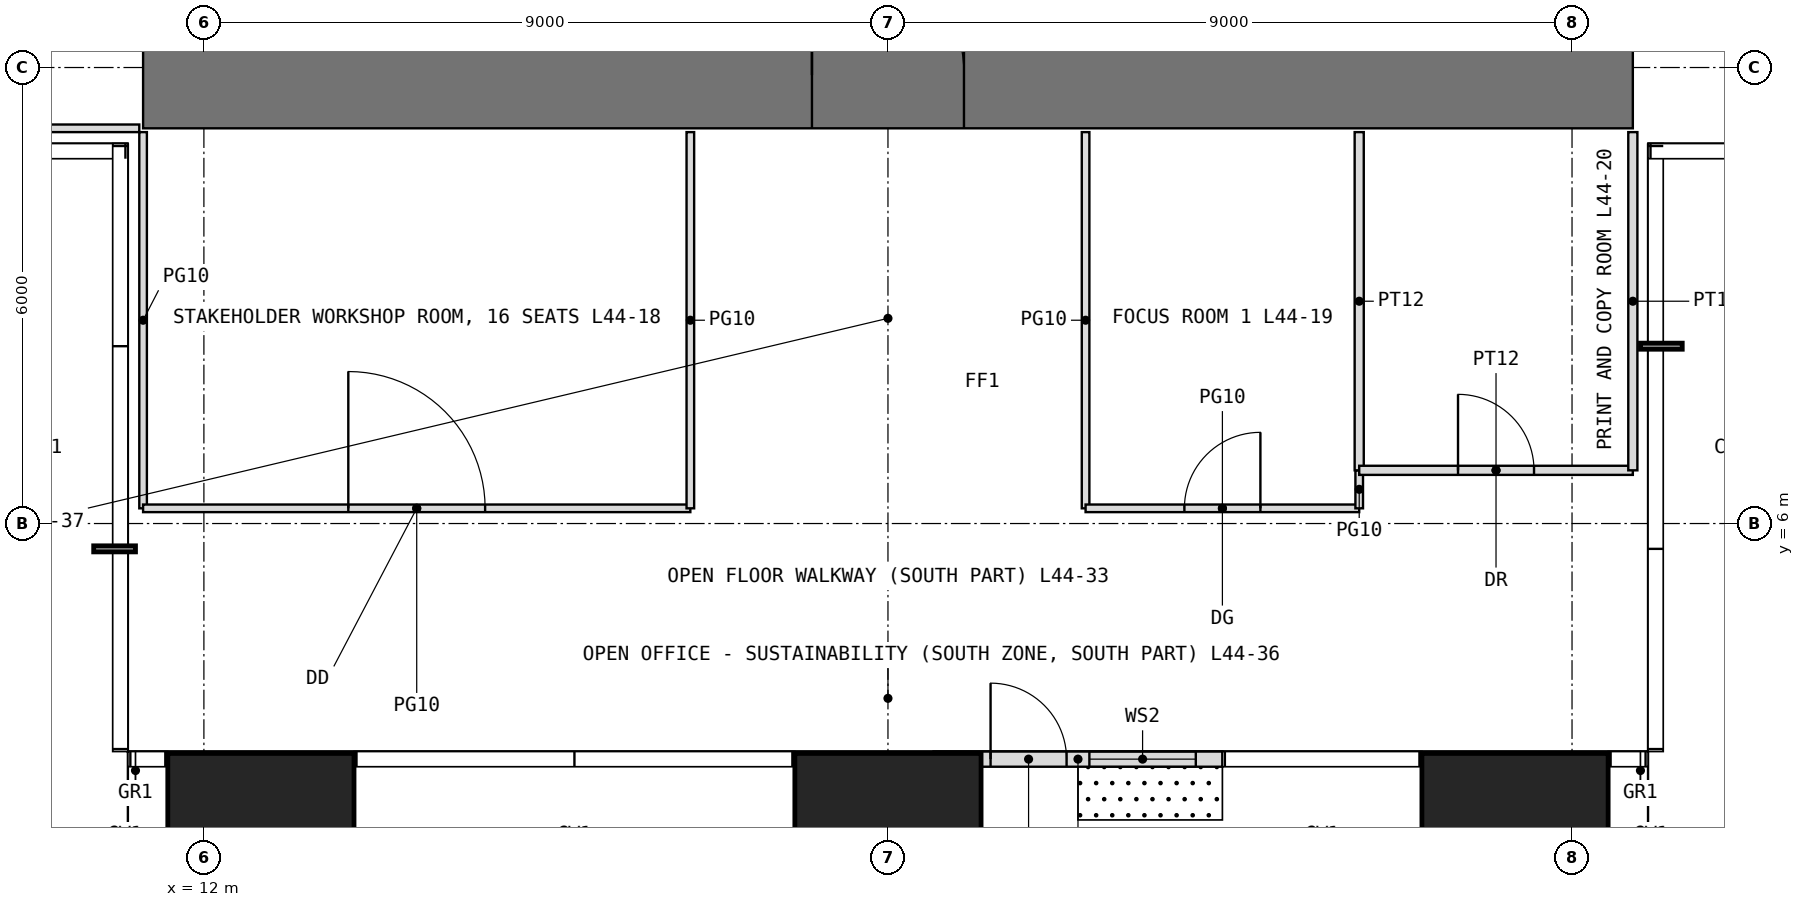
"""IFC4 building model, lengths in metres.
Left out: names, types, materials, properties, quantities, classifications, styles, units other than length and angle.
Written with IfcOpenShell. Run it as: python <this file> out.ifc"""

import sys

from ifc_helpers import new_model, si_unit, direction, frame, frame_2d, origin, origin_2d, place, context, subcontext, project, spatial, rectangle, extrude, element, fill, save


model = new_model("IFC4")
c1 = context("Model", 3, precision=1e-05, world=origin(), true_north=direction((0.0, 1.0)))
c2 = subcontext(c1, "Body", "Model", "MODEL_VIEW")
j1 = project(units=[si_unit("LENGTHUNIT", "METRE"), si_unit("PLANEANGLEUNIT", "RADIAN")], contexts=[c1])
p1 = place(None, origin())
s1 = spatial("IfcSite", under=j1, at=p1, CompositionType="ELEMENT")
p2 = place(p1, origin())
s2 = spatial("IfcBuilding", under=s1, at=p2, CompositionType="ELEMENT")
p3 = place(p2, frame((0.0, 0.0, 186.5)))
s3 = spatial("IfcBuildingStorey", under=s2, at=p3, CompositionType="ELEMENT", Elevation=186.5)
for number, where, z_axis, x_axis in (
    (1, (12.75, 1.75, 0.0), (0.0, 0.0, 1.0), (1.0, 0.0, 0.0)),
    (2, (21.0, 1.75, 0.0), (0.0, 0.0, 1.0), (1.0, 0.0, 0.0)),
    (3, (29.25, 1.75, 0.0), (0.0, 0.0, 1.0), (1.0, 0.0, 0.0)),
):
    element("IfcColumn", number, at=place(p3, frame(where, z_axis=z_axis, x_axis=x_axis)), inside=s3, PredefinedType="COLUMN", context=c2, shape_type="SweptSolid", body=[
        extrude(rectangle(XDim=2.45, YDim=2.45, at=origin_2d()), origin(), (0.0, 0.0, 1.0), 4.0),
    ])
p4 = place(p3, frame((21.6, 2.9, 0.0), z_axis=(0.0, 0.0, 1.0), x_axis=(1.0, 0.0, 0.0)))
e4 = element("IfcWall", 4, at=p4, inside=s3, PredefinedType="USERDEFINED", context=c2, shape_type="SweptSolid", body=[
    extrude(rectangle(XDim=3.8, YDim=0.2, at=frame_2d((1.9, 0.0))), origin(), (0.0, 0.0, 1.0), 3.75),
])
p5 = place(p4, frame((0.75, 0.0, 0.0)))
e5 = element("IfcOpeningElement", 5, at=p5, cuts=e4, PredefinedType="OPENING", context=c2, shape_type="SweptSolid", body=[
    extrude(rectangle(XDim=1.0, YDim=2.4, at=frame_2d((0.5, 1.2))), frame((0.0, 0.11, 0.0), z_axis=(0.0, -1.0, 0.0), x_axis=(1.0, 0.0, 0.0)), (0.0, 0.0, 1.0), 0.22),
])
p6 = place(p4, frame((2.05, 0.0, 0.3)))
e6 = element("IfcOpeningElement", 6, at=p6, cuts=e4, PredefinedType="OPENING", context=c2, shape_type="SweptSolid", body=[
    extrude(rectangle(XDim=1.4, YDim=2.7, at=frame_2d((0.7, 1.35))), frame((0.0, 0.11, 0.0), z_axis=(0.0, -1.0, 0.0), x_axis=(1.0, 0.0, 0.0)), (0.0, 0.0, 1.0), 0.22),
])
p7 = place(p3, frame((11.2, 11.9, -0.05), z_axis=(0.0, 0.0, 1.0), x_axis=(1.0, 0.0, 0.0)))
e7 = element("IfcWall", 7, at=p7, inside=s3, PredefinedType="SHEAR", context=c2, shape_type="SweptSolid", body=[
    extrude(rectangle(XDim=19.6, YDim=1.4, at=frame_2d((9.8, 0.0))), origin(), (0.0, 0.0, 1.0), 4.0),
])
p8 = place(p7, frame((8.8, 0.0, 0.05)))
e8 = element("IfcOpeningElement", 8, at=p8, cuts=e7, PredefinedType="OPENING", context=c2, shape_type="SweptSolid", body=[
    extrude(rectangle(XDim=2.0, YDim=2.2, at=frame_2d((1.0, 1.1))), frame((0.0, 0.71, 0.0), z_axis=(0.0, -1.0, 0.0), x_axis=(1.0, 0.0, 0.0)), (0.0, 0.0, 1.0), 1.42),
])
p9 = place(p3, frame((7.0, 11.2, 0.0), z_axis=(0.0, 0.0, 1.0), x_axis=(1.0, 0.0, 0.0)))
e9 = element("IfcWall", 9, at=p9, inside=s3, PredefinedType="PARTITIONING", context=c2, shape_type="SweptSolid", body=[
    extrude(rectangle(XDim=4.15, YDim=0.1, at=frame_2d((2.075, 0.0))), origin(), (0.0, 0.0, 1.0), 3.75),
])
p10 = place(p3, frame((11.2, 6.2, 0.0), z_axis=(0.0, 0.0, 1.0), x_axis=(0.0, 1.0, 0.0)))
e10 = element("IfcWall", 10, at=p10, inside=s3, PredefinedType="PARTITIONING", context=c2, shape_type="SweptSolid", body=[
    extrude(rectangle(XDim=4.95, YDim=0.1, at=frame_2d((2.475, 0.0))), origin(), (0.0, 0.0, 1.0), 3.75),
])
p11 = place(p3, frame((11.2, 6.2, 0.0), z_axis=(0.0, 0.0, 1.0), x_axis=(1.0, 0.0, 0.0)))
e11 = element("IfcWall", 11, at=p11, inside=s3, PredefinedType="PARTITIONING", context=c2, shape_type="SweptSolid", body=[
    extrude(rectangle(XDim=7.2, YDim=0.1, at=frame_2d((3.6, 0.0))), origin(), (0.0, 0.0, 1.0), 3.75),
])
p12 = place(p11, frame((2.7, 0.0, 0.0)))
e12 = element("IfcOpeningElement", 12, at=p12, cuts=e11, PredefinedType="OPENING", context=c2, shape_type="SweptSolid", body=[
    extrude(rectangle(XDim=1.8, YDim=2.4, at=frame_2d((0.9, 1.2))), frame((0.0, 0.06, 0.0), z_axis=(0.0, -1.0, 0.0), x_axis=(1.0, 0.0, 0.0)), (0.0, 0.0, 1.0), 0.12),
])
for number, where, z_axis, x_axis in (
    (13, (18.4, 6.2, 0.0), (0.0, 0.0, 1.0), (0.0, 1.0, 0.0)),
    (14, (23.6, 6.2, 0.0), (0.0, 0.0, 1.0), (0.0, 1.0, 0.0)),
):
    element("IfcWall", number, at=place(p3, frame(where, z_axis=z_axis, x_axis=x_axis)), inside=s3, PredefinedType="PARTITIONING", context=c2, shape_type="SweptSolid", body=[
        extrude(rectangle(XDim=4.95, YDim=0.1, at=frame_2d((2.475, 0.0))), origin(), (0.0, 0.0, 1.0), 3.75),
    ])
p13 = place(p3, frame((23.6, 6.2, 0.0), z_axis=(0.0, 0.0, 1.0), x_axis=(1.0, 0.0, 0.0)))
e15 = element("IfcWall", 15, at=p13, inside=s3, PredefinedType="PARTITIONING", context=c2, shape_type="SweptSolid", body=[
    extrude(rectangle(XDim=3.6, YDim=0.1, at=frame_2d((1.8, 0.0))), origin(), (0.0, 0.0, 1.0), 3.75),
])
p14 = place(p13, frame((1.3, 0.0, 0.0)))
e16 = element("IfcOpeningElement", 16, at=p14, cuts=e15, PredefinedType="OPENING", context=c2, shape_type="SweptSolid", body=[
    extrude(rectangle(XDim=1.0, YDim=2.4, at=frame_2d((0.5, 1.2))), frame((0.0, 0.06, 0.0), z_axis=(0.0, -1.0, 0.0), x_axis=(1.0, 0.0, 0.0)), (0.0, 0.0, 1.0), 0.12),
])
p15 = place(p3, frame((27.2, 6.2, 0.0), z_axis=(0.0, 0.0, 1.0), x_axis=(0.0, 1.0, 0.0)))
e17 = element("IfcWall", 17, at=p15, inside=s3, PredefinedType="PARTITIONING", context=c2, shape_type="SweptSolid", body=[
    extrude(rectangle(XDim=0.5, YDim=0.1, at=frame_2d((0.25, 0.0))), origin(), (0.0, 0.0, 1.0), 3.75),
])
p16 = place(p3, frame((27.2, 6.7, 0.0), z_axis=(0.0, 0.0, 1.0), x_axis=(0.0, 1.0, 0.0)))
e18 = element("IfcWall", 18, at=p16, inside=s3, PredefinedType="PARTITIONING", context=c2, shape_type="SweptSolid", body=[
    extrude(rectangle(XDim=4.45, YDim=0.12, at=frame_2d((2.225, 0.0))), origin(), (0.0, 0.0, 1.0), 3.75),
])
p17 = place(p3, frame((27.2, 6.7, 0.0), z_axis=(0.0, 0.0, 1.0), x_axis=(1.0, 0.0, 0.0)))
e19 = element("IfcWall", 19, at=p17, inside=s3, PredefinedType="PARTITIONING", context=c2, shape_type="SweptSolid", body=[
    extrude(rectangle(XDim=3.6, YDim=0.12, at=frame_2d((1.8, 0.0))), origin(), (0.0, 0.0, 1.0), 3.75),
])
p18 = place(p17, frame((1.3, 0.0, 0.0)))
e20 = element("IfcOpeningElement", 20, at=p18, cuts=e19, PredefinedType="OPENING", context=c2, shape_type="SweptSolid", body=[
    extrude(rectangle(XDim=1.0, YDim=2.2, at=frame_2d((0.5, 1.1))), frame((0.0, 0.07, 0.0), z_axis=(0.0, -1.0, 0.0), x_axis=(1.0, 0.0, 0.0)), (0.0, 0.0, 1.0), 0.14),
])
p19 = place(p3, frame((30.8, 6.7, 0.0), z_axis=(0.0, 0.0, 1.0), x_axis=(0.0, 1.0, 0.0)))
e21 = element("IfcWall", 21, at=p19, inside=s3, PredefinedType="PARTITIONING", context=c2, shape_type="SweptSolid", body=[
    extrude(rectangle(XDim=4.45, YDim=0.12, at=frame_2d((2.225, 0.0))), origin(), (0.0, 0.0, 1.0), 3.75),
])
p20 = place(p5, origin())
e22 = element("IfcDoor", 22, at=p20, inside=s3, OperationType="SINGLE_SWING_LEFT", PredefinedType="DOOR", context=c2, shape_type="SweptSolid", body=[
    extrude(rectangle(XDim=1.0, YDim=2.4, at=frame_2d((0.5, 1.2))), frame((0.0, 0.025, 0.0), z_axis=(0.0, -1.0, 0.0), x_axis=(1.0, 0.0, 0.0)), (0.0, 0.0, 1.0), 0.05),
])
fill(e5, e22)
p21 = place(p6, origin())
e23 = element("IfcWindow", 23, at=p21, inside=s3, PartitioningType="SINGLE_PANEL", PredefinedType="WINDOW", context=c2, shape_type="SweptSolid", body=[
    extrude(rectangle(XDim=1.4, YDim=2.7, at=frame_2d((0.7, 1.35))), frame((0.0, 0.03, 0.0), z_axis=(0.0, -1.0, 0.0), x_axis=(1.0, 0.0, 0.0)), (0.0, 0.0, 1.0), 0.06),
])
fill(e6, e23)
p22 = place(p8, origin())
e24 = element("IfcDoor", 24, at=p22, inside=s3, OperationType="DOUBLE_DOOR_SINGLE_SWING", PredefinedType="DOOR", context=c2, shape_type="SweptSolid", body=[
    extrude(rectangle(XDim=2.0, YDim=2.2, at=frame_2d((1.0, 1.1))), frame((0.0, 0.025, 0.0), z_axis=(0.0, -1.0, 0.0), x_axis=(1.0, 0.0, 0.0)), (0.0, 0.0, 1.0), 0.05),
])
fill(e8, e24)
p23 = place(p12, origin())
e25 = element("IfcDoor", 25, at=p23, inside=s3, OperationType="DOUBLE_DOOR_SINGLE_SWING", PredefinedType="DOOR", context=c2, shape_type="SweptSolid", body=[
    extrude(rectangle(XDim=1.8, YDim=2.4, at=frame_2d((0.9, 1.2))), frame((0.0, 0.025, 0.0), z_axis=(0.0, -1.0, 0.0), x_axis=(1.0, 0.0, 0.0)), (0.0, 0.0, 1.0), 0.05),
])
fill(e12, e25)
p24 = place(p14, origin())
e26 = element("IfcDoor", 26, at=p24, inside=s3, OperationType="SINGLE_SWING_RIGHT", PredefinedType="DOOR", context=c2, shape_type="SweptSolid", body=[
    extrude(rectangle(XDim=1.0, YDim=2.4, at=frame_2d((0.5, 1.2))), frame((0.0, 0.025, 0.0), z_axis=(0.0, -1.0, 0.0), x_axis=(1.0, 0.0, 0.0)), (0.0, 0.0, 1.0), 0.05),
])
fill(e16, e26)
p25 = place(p18, origin())
e27 = element("IfcDoor", 27, at=p25, inside=s3, OperationType="SINGLE_SWING_LEFT", PredefinedType="DOOR", context=c2, shape_type="SweptSolid", body=[
    extrude(rectangle(XDim=1.0, YDim=2.2, at=frame_2d((0.5, 1.1))), frame((0.0, 0.025, 0.0), z_axis=(0.0, -1.0, 0.0), x_axis=(1.0, 0.0, 0.0)), (0.0, 0.0, 1.0), 0.05),
])
fill(e20, e27)
save(model, sys.argv[1])
